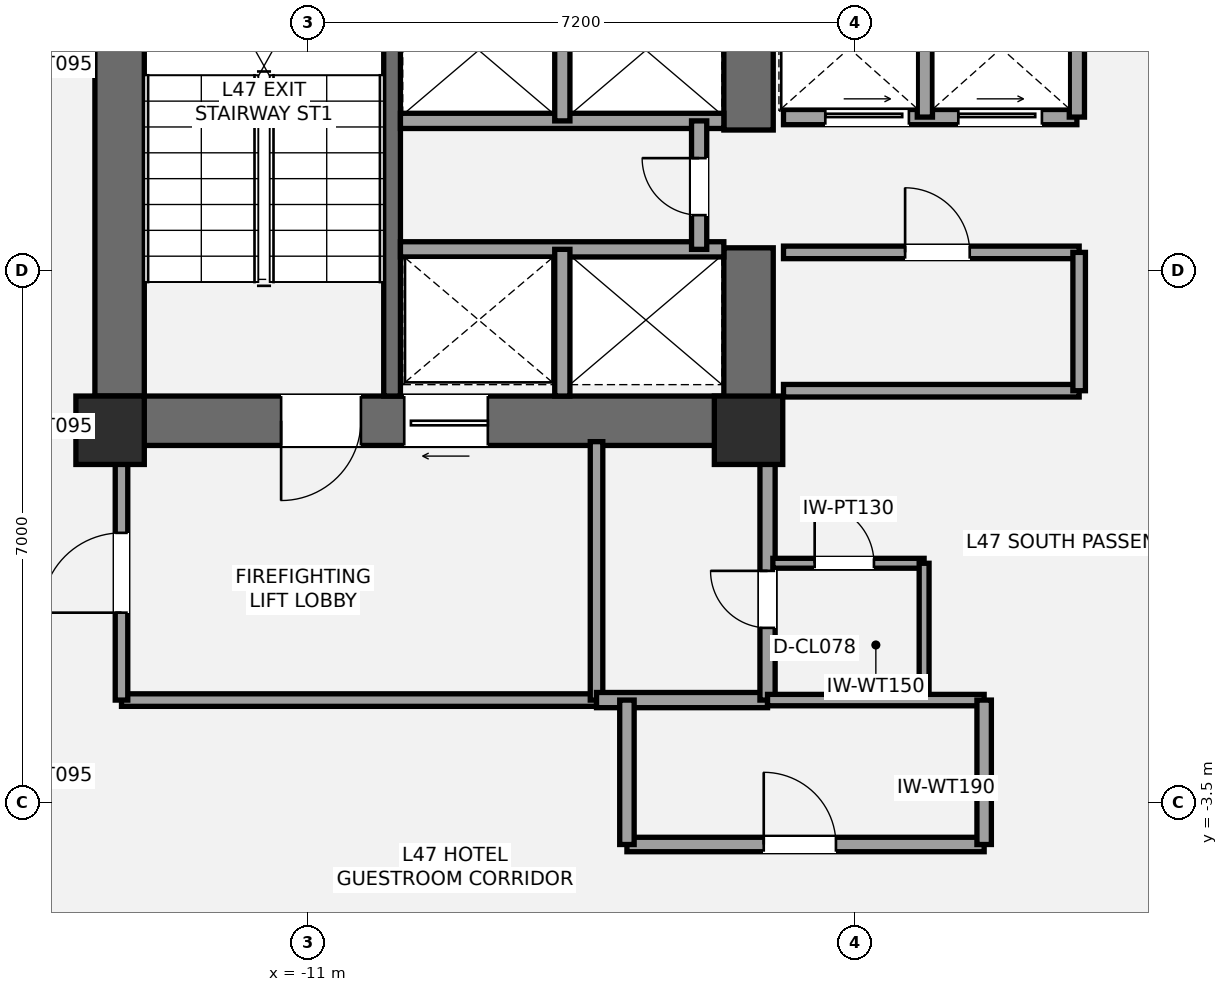
"""IFC4 building model, lengths in metres.
Left out: names, types, materials, properties, quantities, classifications, styles, units other than length and angle.
Written with IfcOpenShell. Run it as: python <this file> out.ifc"""

import sys

from ifc_helpers import new_model, si_unit, direction, frame, frame_2d, origin, origin_2d, place, context, subcontext, project, spatial, rectangle, extrude, element, fill, save


model = new_model("IFC4")
c1 = context("Model", 3, precision=1e-05, world=origin(), true_north=direction((0.0, 1.0)))
c2 = subcontext(c1, "Body", "Model", "MODEL_VIEW")
j1 = project(units=[si_unit("LENGTHUNIT", "METRE"), si_unit("PLANEANGLEUNIT", "RADIAN")], contexts=[c1])
p1 = place(None, origin())
s1 = spatial("IfcSite", under=j1, at=p1, CompositionType="ELEMENT")
p2 = place(p1, origin())
s2 = spatial("IfcBuilding", under=s1, at=p2, CompositionType="ELEMENT")
p3 = place(p2, frame((0.0, 0.0, 172.6)))
s3 = spatial("IfcBuildingStorey", under=s2, at=p3, CompositionType="ELEMENT", Elevation=172.6)
p4 = place(p3, frame((-13.475, 1.2, 0.0), z_axis=(0.0, 0.0, 1.0), x_axis=(0.0, 1.0, 0.0)))
e1 = element("IfcWall", 1, at=p4, inside=s3, PredefinedType="SHEAR", context=c2, shape_type="SweptSolid", body=[
    extrude(rectangle(XDim=8.45, YDim=0.65, at=frame_2d((4.225, 0.0))), origin(), (0.0, 0.0, 1.0), 3.2),
])
p5 = place(p3, frame((-4.875, 1.525, 0.0), z_axis=(0.0, 0.0, 1.0), x_axis=(-1.0, 0.0, 0.0)))
e2 = element("IfcWall", 2, at=p5, inside=s3, PredefinedType="SHEAR", context=c2, shape_type="SweptSolid", body=[
    extrude(rectangle(XDim=8.925, YDim=0.65, at=frame_2d((4.462, 0.0))), origin(), (0.0, 0.0, 1.0), 3.2),
])
p6 = place(p5, frame((5.425, 0.0, 0.0)))
e3 = element("IfcOpeningElement", 3, at=p6, cuts=e2, PredefinedType="OPENING", context=c2, shape_type="SweptSolid", body=[
    extrude(rectangle(XDim=1.05, YDim=2.15, at=frame_2d((0.525, 1.075))), frame((0.0, 0.335, 0.0), z_axis=(0.0, -1.0, 0.0), x_axis=(1.0, 0.0, 0.0)), (0.0, 0.0, 1.0), 0.67),
])
p7 = place(p5, frame((3.755, 0.0, 0.0)))
e4 = element("IfcOpeningElement", 4, at=p7, cuts=e2, PredefinedType="OPENING", context=c2, shape_type="SweptSolid", body=[
    extrude(rectangle(XDim=1.1, YDim=2.2, at=frame_2d((0.55, 1.1))), frame((0.0, 0.335, 0.0), z_axis=(0.0, -1.0, 0.0), x_axis=(1.0, 0.0, 0.0)), (0.0, 0.0, 1.0), 0.67),
])
p8 = place(p3, frame((-5.2, 1.2, 0.0), z_axis=(0.0, 0.0, 1.0), x_axis=(0.0, 1.0, 0.0)))
e5 = element("IfcWall", 5, at=p8, inside=s3, PredefinedType="SHEAR", context=c2, shape_type="SweptSolid", body=[
    extrude(rectangle(XDim=2.6, YDim=0.65, at=frame_2d((1.3, 0.0))), origin(), (0.0, 0.0, 1.0), 3.2),
])
p9 = place(p3, frame((-5.2, 5.35, 0.0), z_axis=(0.0, 0.0, 1.0), x_axis=(0.0, 1.0, 0.0)))
e6 = element("IfcWall", 6, at=p9, inside=s3, PredefinedType="SHEAR", context=c2, shape_type="SweptSolid", body=[
    extrude(rectangle(XDim=2.0, YDim=0.65, at=frame_2d((1.0, 0.0))), origin(), (0.0, 0.0, 1.0), 3.2),
])
p10 = place(p3, frame((-9.89, 1.85, 0.0), z_axis=(0.0, 0.0, 1.0), x_axis=(0.0, 1.0, 0.0)))
e7 = element("IfcWall", 7, at=p10, inside=s3, PredefinedType="SHEAR", context=c2, shape_type="SweptSolid", body=[
    extrude(rectangle(XDim=7.15, YDim=0.22, at=frame_2d((3.575, 0.0))), origin(), (0.0, 0.0, 1.0), 3.2),
])
for number, where, z_axis, x_axis in (
    (8, (-13.6, 1.4, 0.0), (0.0, 0.0, 1.0), (1.0, 0.0, 0.0)),
    (9, (-5.2, 1.4, 0.0), (0.0, 0.0, 1.0), (1.0, 0.0, 0.0)),
):
    element("IfcColumn", number, at=place(p3, frame(where, z_axis=z_axis, x_axis=x_axis)), inside=s3, PredefinedType="COLUMN", context=c2, shape_type="SweptSolid", body=[
        extrude(rectangle(XDim=0.9, YDim=0.9, at=origin_2d()), origin(), (0.0, 0.0, 1.0), 3.2),
    ])
p11 = place(p3, frame((-13.45, -2.15, 0.0), z_axis=(0.0, 0.0, 1.0), x_axis=(1.0, 0.0, 0.0)))
e10 = element("IfcWall", 10, at=p11, inside=s3, PredefinedType="PARTITIONING", context=c2, shape_type="SweptSolid", body=[
    extrude(rectangle(XDim=6.25, YDim=0.165, at=frame_2d((3.125, 0.0))), origin(), (0.0, 0.0, 1.0), 2.473),
])
p12 = place(p3, frame((-13.45, -2.15, 0.0), z_axis=(0.0, 0.0, 1.0), x_axis=(0.0, 1.0, 0.0)))
e11 = element("IfcWall", 11, at=p12, inside=s3, PredefinedType="PARTITIONING", context=c2, shape_type="SweptSolid", body=[
    extrude(rectangle(XDim=3.4, YDim=0.165, at=frame_2d((1.7, 0.0))), origin(), (0.0, 0.0, 1.0), 2.473),
])
p13 = place(p12, frame((1.15, 0.0, 0.0)))
e12 = element("IfcOpeningElement", 12, at=p13, cuts=e11, PredefinedType="OPENING", context=c2, shape_type="SweptSolid", body=[
    extrude(rectangle(XDim=1.05, YDim=2.15, at=frame_2d((0.525, 1.075))), frame((0.0, 0.093, 0.0), z_axis=(0.0, -1.0, 0.0), x_axis=(1.0, 0.0, 0.0)), (0.0, 0.0, 1.0), 0.185),
])
p14 = place(p3, frame((-7.2, -2.15, 0.0), z_axis=(0.0, 0.0, 1.0), x_axis=(0.0, 1.0, 0.0)))
e13 = element("IfcWall", 13, at=p14, inside=s3, PredefinedType="PARTITIONING", context=c2, shape_type="SweptSolid", body=[
    extrude(rectangle(XDim=3.4, YDim=0.165, at=frame_2d((1.7, 0.0))), origin(), (0.0, 0.0, 1.0), 2.473),
])
p15 = place(p3, frame((-7.2, -2.15, 0.0), z_axis=(0.0, 0.0, 1.0), x_axis=(1.0, 0.0, 0.0)))
e14 = element("IfcWall", 14, at=p15, inside=s3, PredefinedType="SOLIDWALL", context=c2, shape_type="SweptSolid", body=[
    extrude(rectangle(XDim=2.25, YDim=0.2, at=frame_2d((1.125, 0.0))), origin(), (0.0, 0.0, 1.0), 3.02),
])
p16 = place(p3, frame((-4.95, -2.15, 0.0), z_axis=(0.0, 0.0, 1.0), x_axis=(0.0, 1.0, 0.0)))
e15 = element("IfcWall", 15, at=p16, inside=s3, PredefinedType="SOLIDWALL", context=c2, shape_type="SweptSolid", body=[
    extrude(rectangle(XDim=3.4, YDim=0.2, at=frame_2d((1.7, 0.0))), origin(), (0.0, 0.0, 1.0), 2.473),
])
p17 = place(p16, frame((0.95, 0.0, 0.0)))
e16 = element("IfcOpeningElement", 16, at=p17, cuts=e15, PredefinedType="OPENING", context=c2, shape_type="SweptSolid", body=[
    extrude(rectangle(XDim=0.75, YDim=2.1, at=frame_2d((0.375, 1.05))), frame((0.0, 0.11, 0.0), z_axis=(0.0, -1.0, 0.0), x_axis=(1.0, 0.0, 0.0)), (0.0, 0.0, 1.0), 0.22),
])
p18 = place(p3, frame((-4.88, -0.35, 0.0), z_axis=(0.0, 0.0, 1.0), x_axis=(1.0, 0.0, 0.0)))
e17 = element("IfcWall", 17, at=p18, inside=s3, PredefinedType="PARTITIONING", context=c2, shape_type="SweptSolid", body=[
    extrude(rectangle(XDim=1.99, YDim=0.13, at=frame_2d((0.995, 0.0))), origin(), (0.0, 0.0, 1.0), 3.02),
])
p19 = place(p18, frame((0.55, 0.0, 0.0)))
e18 = element("IfcOpeningElement", 18, at=p19, cuts=e17, PredefinedType="OPENING", context=c2, shape_type="SweptSolid", body=[
    extrude(rectangle(XDim=0.78, YDim=2.1, at=frame_2d((0.39, 1.05))), frame((0.0, 0.075, 0.0), z_axis=(0.0, -1.0, 0.0), x_axis=(1.0, 0.0, 0.0)), (0.0, 0.0, 1.0), 0.15),
])
p20 = place(p3, frame((-2.89, -2.15, 0.0), z_axis=(0.0, 0.0, 1.0), x_axis=(0.0, 1.0, 0.0)))
e19 = element("IfcWall", 19, at=p20, inside=s3, PredefinedType="PARTITIONING", context=c2, shape_type="SweptSolid", body=[
    extrude(rectangle(XDim=1.8, YDim=0.13, at=frame_2d((0.9, 0.0))), origin(), (0.0, 0.0, 1.0), 3.02),
])
p21 = place(p3, frame((-9.78, 3.78, 0.0), z_axis=(0.0, 0.0, 1.0), x_axis=(1.0, 0.0, 0.0)))
e20 = element("IfcWall", 20, at=p21, inside=s3, PredefinedType="SOLIDWALL", context=c2, shape_type="SweptSolid", body=[
    extrude(rectangle(XDim=4.255, YDim=0.2, at=frame_2d((2.127, 0.0))), origin(), (0.0, 0.0, 1.0), 3.02),
])
p22 = place(p3, frame((-7.65, 1.85, 0.0), z_axis=(0.0, 0.0, 1.0), x_axis=(0.0, 1.0, 0.0)))
e21 = element("IfcWall", 21, at=p22, inside=s3, PredefinedType="SOLIDWALL", context=c2, shape_type="SweptSolid", body=[
    extrude(rectangle(XDim=1.93, YDim=0.2, at=frame_2d((0.965, 0.0))), origin(), (0.0, 0.0, 1.0), 3.02),
])
p23 = place(p3, frame((-9.78, 5.47, 0.0), z_axis=(0.0, 0.0, 1.0), x_axis=(1.0, 0.0, 0.0)))
e22 = element("IfcWall", 22, at=p23, inside=s3, PredefinedType="SOLIDWALL", context=c2, shape_type="SweptSolid", body=[
    extrude(rectangle(XDim=4.255, YDim=0.2, at=frame_2d((2.127, 0.0))), origin(), (0.0, 0.0, 1.0), 3.02),
])
p24 = place(p3, frame((-7.65, 5.47, 0.0), z_axis=(0.0, 0.0, 1.0), x_axis=(0.0, 1.0, 0.0)))
e23 = element("IfcWall", 23, at=p24, inside=s3, PredefinedType="SOLIDWALL", context=c2, shape_type="SweptSolid", body=[
    extrude(rectangle(XDim=1.86, YDim=0.2, at=frame_2d((0.93, 0.0))), origin(), (0.0, 0.0, 1.0), 3.02),
])
p25 = place(p3, frame((-5.85, 3.78, 0.0), z_axis=(0.0, 0.0, 1.0), x_axis=(0.0, 1.0, 0.0)))
e24 = element("IfcWall", 24, at=p25, inside=s3, PredefinedType="SOLIDWALL", context=c2, shape_type="SweptSolid", body=[
    extrude(rectangle(XDim=1.69, YDim=0.2, at=frame_2d((0.845, 0.0))), origin(), (0.0, 0.0, 1.0), 3.02),
])
p26 = place(p25, frame((0.45, 0.0, 0.0)))
e25 = element("IfcOpeningElement", 25, at=p26, cuts=e24, PredefinedType="OPENING", context=c2, shape_type="SweptSolid", body=[
    extrude(rectangle(XDim=0.75, YDim=2.1, at=frame_2d((0.375, 1.05))), frame((0.0, 0.11, 0.0), z_axis=(0.0, -1.0, 0.0), x_axis=(1.0, 0.0, 0.0)), (0.0, 0.0, 1.0), 0.22),
])
p27 = place(p3, frame((-4.74, 1.92, 0.0), z_axis=(0.0, 0.0, 1.0), x_axis=(1.0, 0.0, 0.0)))
e26 = element("IfcWall", 26, at=p27, inside=s3, PredefinedType="PARTITIONING", context=c2, shape_type="SweptSolid", body=[
    extrude(rectangle(XDim=3.89, YDim=0.165, at=frame_2d((1.945, 0.0))), origin(), (0.0, 0.0, 1.0), 2.16),
])
p28 = place(p3, frame((-4.74, 3.74, 0.0), z_axis=(0.0, 0.0, 1.0), x_axis=(1.0, 0.0, 0.0)))
e27 = element("IfcWall", 27, at=p28, inside=s3, PredefinedType="PARTITIONING", context=c2, shape_type="SweptSolid", body=[
    extrude(rectangle(XDim=3.89, YDim=0.165, at=frame_2d((1.945, 0.0))), origin(), (0.0, 0.0, 1.0), 3.02),
])
p29 = place(p28, frame((1.6, 0.0, 0.0)))
e28 = element("IfcOpeningElement", 28, at=p29, cuts=e27, PredefinedType="OPENING", context=c2, shape_type="SweptSolid", body=[
    extrude(rectangle(XDim=0.85, YDim=2.1, at=frame_2d((0.425, 1.05))), frame((0.0, 0.093, 0.0), z_axis=(0.0, -1.0, 0.0), x_axis=(1.0, 0.0, 0.0)), (0.0, 0.0, 1.0), 0.185),
])
p30 = place(p3, frame((-0.85, 1.92, 0.0), z_axis=(0.0, 0.0, 1.0), x_axis=(0.0, 1.0, 0.0)))
e29 = element("IfcWall", 29, at=p30, inside=s3, PredefinedType="PARTITIONING", context=c2, shape_type="SweptSolid", body=[
    extrude(rectangle(XDim=1.82, YDim=0.165, at=frame_2d((0.91, 0.0))), origin(), (0.0, 0.0, 1.0), 3.02),
])
p31 = place(p3, frame((-4.74, 5.52, 0.0), z_axis=(0.0, 0.0, 1.0), x_axis=(1.0, 0.0, 0.0)))
e30 = element("IfcWall", 30, at=p31, inside=s3, PredefinedType="SOLIDWALL", context=c2, shape_type="SweptSolid", body=[
    extrude(rectangle(XDim=3.86, YDim=0.2, at=frame_2d((1.93, 0.0))), origin(), (0.0, 0.0, 1.0), 3.02),
])
p32 = place(p31, frame((0.55, 0.0, 0.0)))
e31 = element("IfcOpeningElement", 31, at=p32, cuts=e30, PredefinedType="OPENING", context=c2, shape_type="SweptSolid", body=[
    extrude(rectangle(XDim=1.1, YDim=2.2, at=frame_2d((0.55, 1.1))), frame((0.0, 0.11, 0.0), z_axis=(0.0, -1.0, 0.0), x_axis=(1.0, 0.0, 0.0)), (0.0, 0.0, 1.0), 0.22),
])
p33 = place(p31, frame((2.3, 0.0, 0.0)))
e32 = element("IfcOpeningElement", 32, at=p33, cuts=e30, PredefinedType="OPENING", context=c2, shape_type="SweptSolid", body=[
    extrude(rectangle(XDim=1.1, YDim=2.2, at=frame_2d((0.55, 1.1))), frame((0.0, 0.11, 0.0), z_axis=(0.0, -1.0, 0.0), x_axis=(1.0, 0.0, 0.0)), (0.0, 0.0, 1.0), 0.22),
])
for number, where, z_axis, x_axis in (
    (33, (-2.88, 5.52, 0.0), (0.0, 0.0, 1.0), (0.0, 1.0, 0.0)),
    (34, (-0.88, 5.52, 0.0), (0.0, 0.0, 1.0), (0.0, 1.0, 0.0)),
):
    element("IfcWall", number, at=place(p3, frame(where, z_axis=z_axis, x_axis=x_axis)), inside=s3, PredefinedType="SOLIDWALL", context=c2, shape_type="SweptSolid", body=[
        extrude(rectangle(XDim=1.81, YDim=0.2, at=frame_2d((0.905, 0.0))), origin(), (0.0, 0.0, 1.0), 3.02),
    ])
p34 = place(p3, frame((-6.8, -4.05, 0.0), z_axis=(0.0, 0.0, 1.0), x_axis=(1.0, 0.0, 0.0)))
e35 = element("IfcWall", 35, at=p34, inside=s3, PredefinedType="PLUMBINGWALL", context=c2, shape_type="SweptSolid", body=[
    extrude(rectangle(XDim=4.7, YDim=0.19, at=frame_2d((2.35, 0.0))), origin(), (0.0, 0.0, 1.0), 3.02),
])
p35 = place(p34, frame((1.8, 0.0, 0.0)))
e36 = element("IfcOpeningElement", 36, at=p35, cuts=e35, PredefinedType="OPENING", context=c2, shape_type="SweptSolid", body=[
    extrude(rectangle(XDim=0.95, YDim=2.15, at=frame_2d((0.475, 1.075))), frame((0.0, 0.105, 0.0), z_axis=(0.0, -1.0, 0.0), x_axis=(1.0, 0.0, 0.0)), (0.0, 0.0, 1.0), 0.21),
])
p36 = place(p3, frame((-4.95, -2.15, 0.0), z_axis=(0.0, 0.0, 1.0), x_axis=(1.0, 0.0, 0.0)))
e37 = element("IfcWall", 37, at=p36, inside=s3, PredefinedType="PLUMBINGWALL", context=c2, shape_type="SweptSolid", body=[
    extrude(rectangle(XDim=2.85, YDim=0.15, at=frame_2d((1.425, 0.0))), origin(), (0.0, 0.0, 1.0), 3.02),
])
p37 = place(p3, frame((-6.8, -4.05, 0.0), z_axis=(0.0, 0.0, 1.0), x_axis=(0.0, 1.0, 0.0)))
e38 = element("IfcWall", 38, at=p37, inside=s3, PredefinedType="PLUMBINGWALL", context=c2, shape_type="SweptSolid", body=[
    extrude(rectangle(XDim=1.9, YDim=0.19, at=frame_2d((0.95, 0.0))), origin(), (0.0, 0.0, 1.0), 2.473),
])
p38 = place(p3, frame((-2.1, -4.05, 0.0), z_axis=(0.0, 0.0, 1.0), x_axis=(0.0, 1.0, 0.0)))
e39 = element("IfcWall", 39, at=p38, inside=s3, PredefinedType="PLUMBINGWALL", context=c2, shape_type="SweptSolid", body=[
    extrude(rectangle(XDim=1.9, YDim=0.19, at=frame_2d((0.95, 0.0))), origin(), (0.0, 0.0, 1.0), 3.02),
])
p39 = place(p6, origin())
e40 = element("IfcDoor", 40, at=p39, inside=s3, OperationType="SINGLE_SWING_RIGHT", PredefinedType="DOOR", context=c2, shape_type="SweptSolid", body=[
    extrude(rectangle(XDim=1.05, YDim=2.15, at=frame_2d((0.525, 1.075))), frame((0.0, 0.025, 0.0), z_axis=(0.0, -1.0, 0.0), x_axis=(1.0, 0.0, 0.0)), (0.0, 0.0, 1.0), 0.05),
])
fill(e3, e40)
p40 = place(p13, origin())
e41 = element("IfcDoor", 41, at=p40, inside=s3, OperationType="SINGLE_SWING_LEFT", PredefinedType="DOOR", context=c2, shape_type="SweptSolid", body=[
    extrude(rectangle(XDim=1.05, YDim=2.15, at=frame_2d((0.525, 1.075))), frame((0.0, 0.025, 0.0), z_axis=(0.0, -1.0, 0.0), x_axis=(1.0, 0.0, 0.0)), (0.0, 0.0, 1.0), 0.05),
])
fill(e12, e41)
p41 = place(p17, origin())
e42 = element("IfcDoor", 42, at=p41, inside=s3, OperationType="SINGLE_SWING_RIGHT", PredefinedType="DOOR", context=c2, shape_type="SweptSolid", body=[
    extrude(rectangle(XDim=0.75, YDim=2.1, at=frame_2d((0.375, 1.05))), frame((0.0, 0.025, 0.0), z_axis=(0.0, -1.0, 0.0), x_axis=(1.0, 0.0, 0.0)), (0.0, 0.0, 1.0), 0.05),
])
fill(e16, e42)
p42 = place(p19, origin())
e43 = element("IfcDoor", 43, at=p42, inside=s3, OperationType="SINGLE_SWING_LEFT", PredefinedType="DOOR", context=c2, shape_type="SweptSolid", body=[
    extrude(rectangle(XDim=0.78, YDim=2.1, at=frame_2d((0.39, 1.05))), frame((0.0, 0.025, 0.0), z_axis=(0.0, -1.0, 0.0), x_axis=(1.0, 0.0, 0.0)), (0.0, 0.0, 1.0), 0.05),
])
fill(e18, e43)
p43 = place(p7, origin())
e44 = element("IfcDoor", 44, at=p43, inside=s3, OperationType="SLIDING_TO_LEFT", PredefinedType="DOOR", context=c2, shape_type="SweptSolid", body=[
    extrude(rectangle(XDim=1.1, YDim=2.2, at=frame_2d((0.55, 1.1))), frame((0.0, 0.025, 0.0), z_axis=(0.0, -1.0, 0.0), x_axis=(1.0, 0.0, 0.0)), (0.0, 0.0, 1.0), 0.05),
])
fill(e4, e44)
p44 = place(p26, origin())
e45 = element("IfcDoor", 45, at=p44, inside=s3, OperationType="SINGLE_SWING_RIGHT", PredefinedType="DOOR", context=c2, shape_type="SweptSolid", body=[
    extrude(rectangle(XDim=0.75, YDim=2.1, at=frame_2d((0.375, 1.05))), frame((0.0, 0.025, 0.0), z_axis=(0.0, -1.0, 0.0), x_axis=(1.0, 0.0, 0.0)), (0.0, 0.0, 1.0), 0.05),
])
fill(e25, e45)
p45 = place(p29, origin())
e46 = element("IfcDoor", 46, at=p45, inside=s3, OperationType="SINGLE_SWING_LEFT", PredefinedType="DOOR", context=c2, shape_type="SweptSolid", body=[
    extrude(rectangle(XDim=0.85, YDim=2.1, at=frame_2d((0.425, 1.05))), frame((0.0, 0.025, 0.0), z_axis=(0.0, -1.0, 0.0), x_axis=(1.0, 0.0, 0.0)), (0.0, 0.0, 1.0), 0.05),
])
fill(e28, e46)
p46 = place(p32, origin())
e47 = element("IfcDoor", 47, at=p46, inside=s3, OperationType="SLIDING_TO_LEFT", PredefinedType="DOOR", context=c2, shape_type="SweptSolid", body=[
    extrude(rectangle(XDim=1.1, YDim=2.2, at=frame_2d((0.55, 1.1))), frame((0.0, 0.025, 0.0), z_axis=(0.0, -1.0, 0.0), x_axis=(1.0, 0.0, 0.0)), (0.0, 0.0, 1.0), 0.05),
])
fill(e31, e47)
p47 = place(p33, origin())
e48 = element("IfcDoor", 48, at=p47, inside=s3, OperationType="SLIDING_TO_LEFT", PredefinedType="DOOR", context=c2, shape_type="SweptSolid", body=[
    extrude(rectangle(XDim=1.1, YDim=2.2, at=frame_2d((0.55, 1.1))), frame((0.0, 0.025, 0.0), z_axis=(0.0, -1.0, 0.0), x_axis=(1.0, 0.0, 0.0)), (0.0, 0.0, 1.0), 0.05),
])
fill(e32, e48)
p48 = place(p35, origin())
e49 = element("IfcDoor", 49, at=p48, inside=s3, OperationType="SINGLE_SWING_LEFT", PredefinedType="DOOR", context=c2, shape_type="SweptSolid", body=[
    extrude(rectangle(XDim=0.95, YDim=2.15, at=frame_2d((0.475, 1.075))), frame((0.0, 0.025, 0.0), z_axis=(0.0, -1.0, 0.0), x_axis=(1.0, 0.0, 0.0)), (0.0, 0.0, 1.0), 0.05),
])
fill(e36, e49)
save(model, sys.argv[1])
